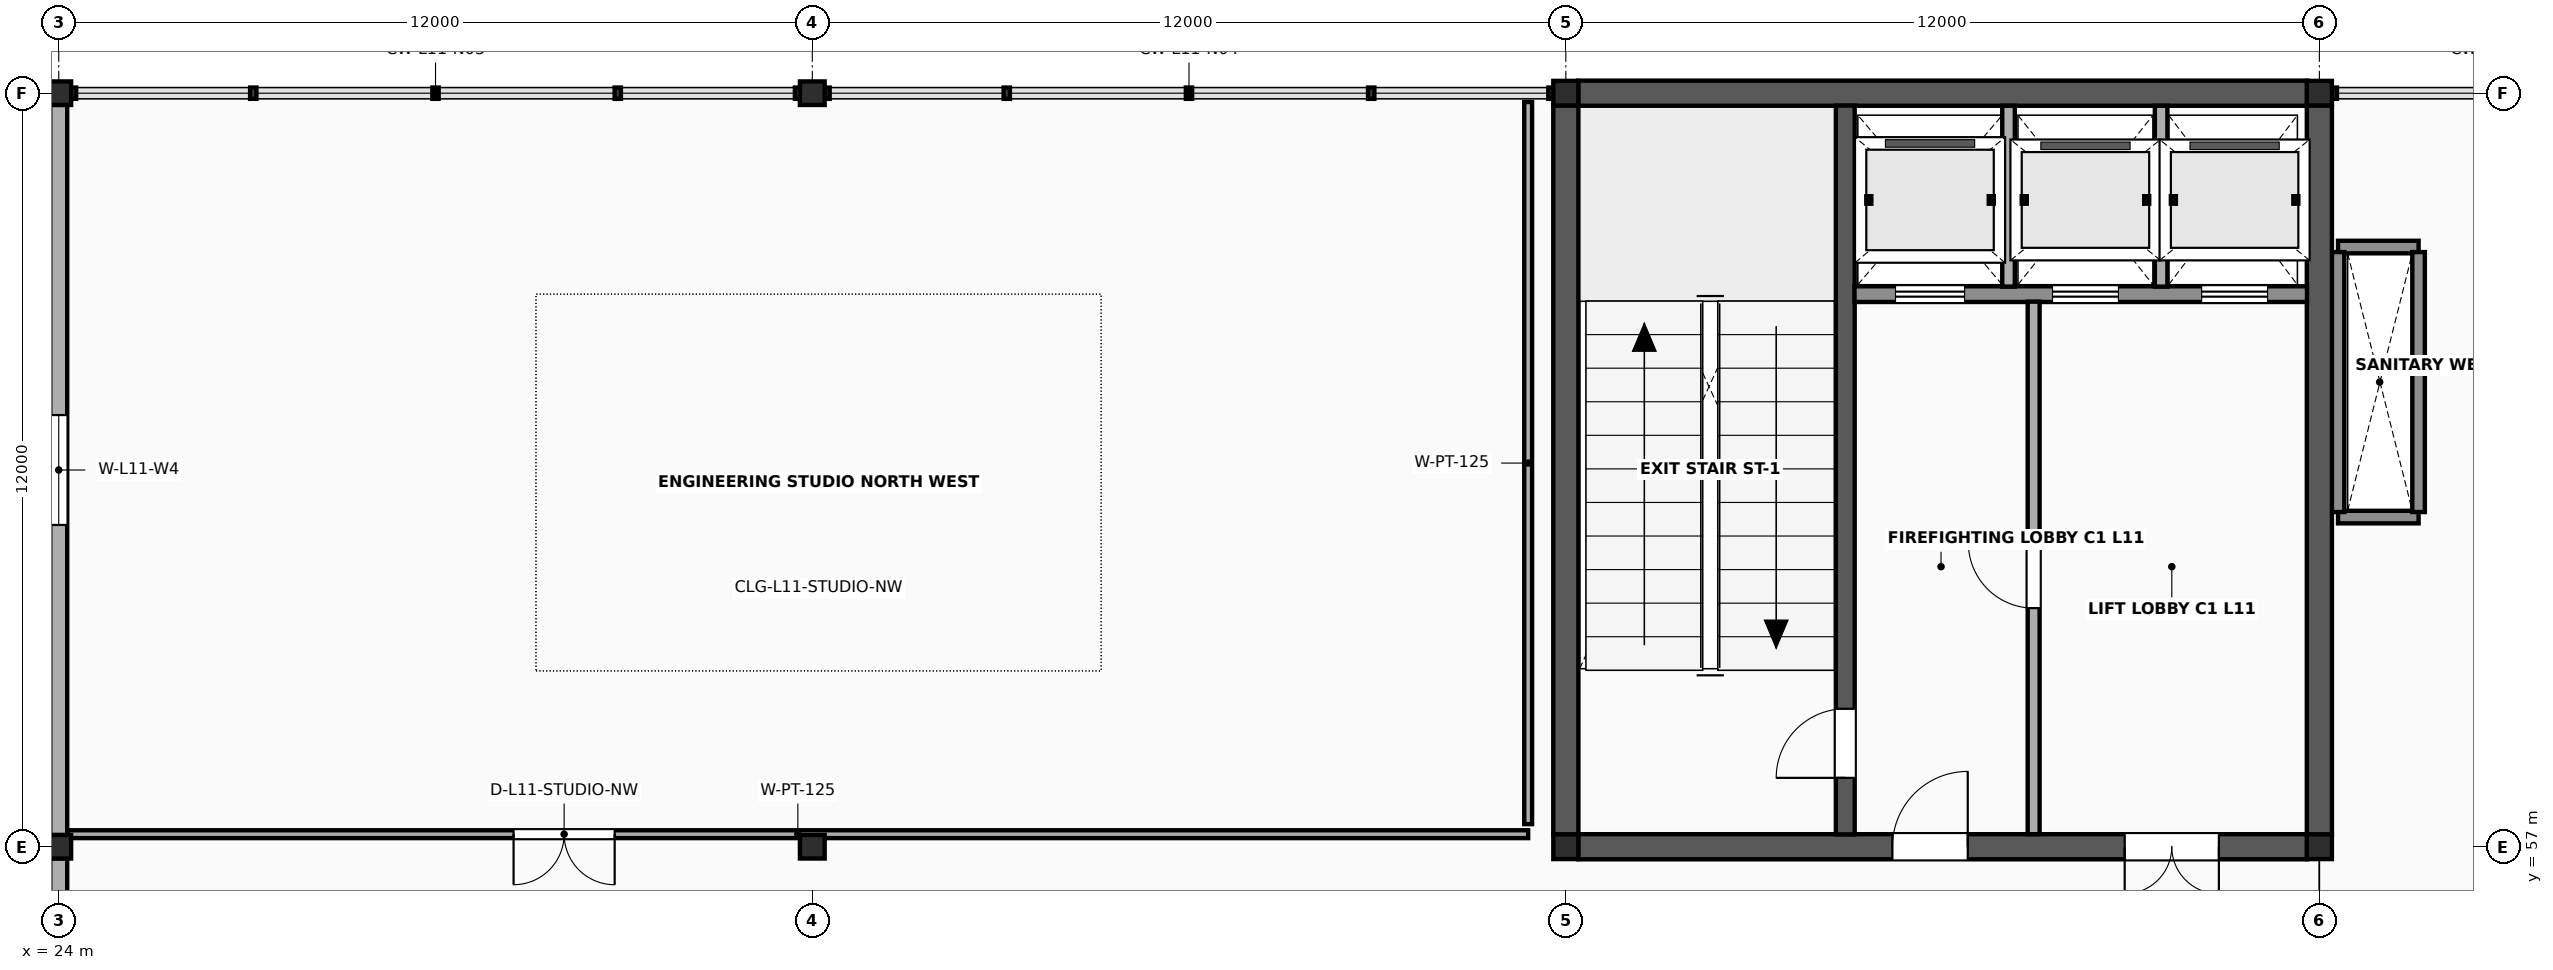
"""IFC4 building model, lengths in metres.
Left out: names, types, materials, properties, quantities, classifications, styles, units other than length and angle.
Written with IfcOpenShell. Run it as: python <this file> out.ifc"""

import sys

from ifc_helpers import new_model, si_unit, direction, frame, frame_2d, origin, origin_2d, place, context, subcontext, project, spatial, rectangle, i_section, extrude, element, fill, save


model = new_model("IFC4")
c1 = context("Model", 3, precision=1e-05, world=origin(), true_north=direction((0.0, 1.0)))
c2 = subcontext(c1, "Body", "Model", "MODEL_VIEW")
j1 = project(units=[si_unit("LENGTHUNIT", "METRE"), si_unit("PLANEANGLEUNIT", "RADIAN")], contexts=[c1])
p1 = place(None, origin())
s1 = spatial("IfcSite", under=j1, at=p1, CompositionType="ELEMENT")
p2 = place(p1, origin())
s2 = spatial("IfcBuilding", under=s1, at=p2, CompositionType="ELEMENT")
p3 = place(p2, frame((0.0, 0.0, 45.6)))
s3 = spatial("IfcBuildingStorey", under=s2, at=p3, CompositionType="ELEMENT", Elevation=45.6)
for number, where, z_axis, x_axis in (
    (1, (24.0, 57.0, 0.0), (0.0, 0.0, 1.0), (1.0, 0.0, 0.0)),
    (2, (24.0, 69.0, 0.0), (0.0, 0.0, 1.0), (1.0, 0.0, 0.0)),
    (3, (36.0, 57.0, 0.0), (0.0, 0.0, 1.0), (1.0, 0.0, 0.0)),
    (4, (36.0, 69.0, 0.0), (0.0, 0.0, 1.0), (1.0, 0.0, 0.0)),
):
    element("IfcColumn", number, at=place(p3, frame(where, z_axis=z_axis, x_axis=x_axis)), inside=s3, PredefinedType="COLUMN", context=c2, shape_type="SweptSolid", body=[
        extrude(i_section(OverallWidth=0.394, OverallDepth=0.375, WebThickness=0.017, FlangeThickness=0.028, FilletRadius=0.018, at=origin_2d()), origin(), (0.0, 0.0, 1.0), 4.0),
    ])
for number, where, z_axis, x_axis in (
    (5, (48.0, 57.0, 0.0), (0.0, 0.0, 1.0), (1.0, 0.0, 0.0)),
    (6, (48.0, 69.0, 0.0), (0.0, 0.0, 1.0), (1.0, 0.0, 0.0)),
    (7, (60.0, 57.0, 0.0), (0.0, 0.0, 1.0), (1.0, 0.0, 0.0)),
    (8, (60.0, 69.0, 0.0), (0.0, 0.0, 1.0), (1.0, 0.0, 0.0)),
):
    element("IfcColumn", number, at=place(p3, frame(where, z_axis=z_axis, x_axis=x_axis)), inside=s3, PredefinedType="COLUMN", context=c2, shape_type="SweptSolid", body=[
        extrude(i_section(OverallWidth=0.399, OverallDepth=0.393, WebThickness=0.023, FlangeThickness=0.037, FilletRadius=0.018, at=origin_2d()), origin(), (0.0, 0.0, 1.0), 4.0),
    ])
for number, where, z_axis, x_axis in (
    (9, (60.297, 62.25, 0.0), (0.0, 0.0, 1.0), (1.0, 0.0, 0.0)),
    (10, (60.297, 66.55, 0.0), (0.0, 0.0, 1.0), (1.0, 0.0, 0.0)),
):
    element("IfcWall", number, at=place(p3, frame(where, z_axis=z_axis, x_axis=x_axis)), inside=s3, PredefinedType="SOLIDWALL", context=c2, shape_type="SweptSolid", body=[
        extrude(rectangle(XDim=1.283, YDim=0.2, at=frame_2d((0.642, 0.0))), origin(), (0.0, 0.0, 1.0), 3.843),
    ])
for number, where, z_axis, x_axis in (
    (11, (60.297, 62.33, 0.0), (0.0, 0.0, 1.0), (0.0, 1.0, 0.0)),
    (12, (61.58, 62.33, 0.0), (0.0, 0.0, 1.0), (0.0, 1.0, 0.0)),
):
    element("IfcWall", number, at=place(p3, frame(where, z_axis=z_axis, x_axis=x_axis)), inside=s3, PredefinedType="SOLIDWALL", context=c2, shape_type="SweptSolid", body=[
        extrude(rectangle(XDim=4.14, YDim=0.2, at=frame_2d((2.07, 0.0))), origin(), (0.0, 0.0, 1.0), 3.843),
    ])
p4 = place(p3, frame((48.197, 57.0, 0.0), z_axis=(0.0, 0.0, 1.0), x_axis=(1.0, 0.0, 0.0)))
e13 = element("IfcWall", 13, at=p4, inside=s3, PredefinedType="SHEAR", context=c2, shape_type="SweptSolid", body=[
    extrude(rectangle(XDim=11.607, YDim=0.4, at=frame_2d((5.803, 0.0))), origin(), (0.0, 0.0, 1.0), 3.843),
])
p5 = place(p4, frame((5.004, 0.0, 0.0)))
e14 = element("IfcOpeningElement", 14, at=p5, cuts=e13, PredefinedType="OPENING", context=c2, shape_type="SweptSolid", body=[
    extrude(rectangle(XDim=1.2, YDim=2.2, at=frame_2d((0.6, 1.1))), frame((0.0, 0.215, 0.0), z_axis=(0.0, -1.0, 0.0), x_axis=(1.0, 0.0, 0.0)), (0.0, 0.0, 1.0), 0.43),
])
p6 = place(p4, frame((8.703, 0.0, 0.0)))
e15 = element("IfcOpeningElement", 15, at=p6, cuts=e13, PredefinedType="OPENING", context=c2, shape_type="SweptSolid", body=[
    extrude(rectangle(XDim=1.5, YDim=2.25, at=frame_2d((0.75, 1.125))), frame((0.0, 0.215, 0.0), z_axis=(0.0, -1.0, 0.0), x_axis=(1.0, 0.0, 0.0)), (0.0, 0.0, 1.0), 0.43),
])
p7 = place(p3, frame((48.197, 69.0, 0.0), z_axis=(0.0, 0.0, 1.0), x_axis=(1.0, 0.0, 0.0)))
e16 = element("IfcWall", 16, at=p7, inside=s3, PredefinedType="SHEAR", context=c2, shape_type="SweptSolid", body=[
    extrude(rectangle(XDim=11.607, YDim=0.4, at=frame_2d((5.803, 0.0))), origin(), (0.0, 0.0, 1.0), 3.843),
])
for number, where, z_axis, x_axis in (
    (17, (48.0, 57.194, 0.0), (0.0, 0.0, 1.0), (0.0, 1.0, 0.0)),
    (18, (60.0, 57.194, 0.0), (0.0, 0.0, 1.0), (0.0, 1.0, 0.0)),
):
    element("IfcWall", number, at=place(p3, frame(where, z_axis=z_axis, x_axis=x_axis)), inside=s3, PredefinedType="SHEAR", context=c2, shape_type="SweptSolid", body=[
        extrude(rectangle(XDim=11.613, YDim=0.4, at=frame_2d((5.806, 0.0))), origin(), (0.0, 0.0, 1.0), 3.843),
    ])
p8 = place(p3, frame((52.45, 57.197, 0.0), z_axis=(0.0, 0.0, 1.0), x_axis=(0.0, 1.0, 0.0)))
e19 = element("IfcWall", 19, at=p8, inside=s3, PredefinedType="SHEAR", context=c2, shape_type="SweptSolid", body=[
    extrude(rectangle(XDim=11.606, YDim=0.3, at=frame_2d((5.803, 0.0))), origin(), (0.0, 0.0, 1.0), 3.843),
])
p9 = place(p8, frame((0.9, 0.0, 0.0)))
e20 = element("IfcOpeningElement", 20, at=p9, cuts=e19, PredefinedType="OPENING", context=c2, shape_type="SweptSolid", body=[
    extrude(rectangle(XDim=1.1, YDim=2.2, at=frame_2d((0.55, 1.1))), frame((0.0, 0.165, 0.0), z_axis=(0.0, -1.0, 0.0), x_axis=(1.0, 0.0, 0.0)), (0.0, 0.0, 1.0), 0.33),
])
p10 = place(p3, frame((52.597, 65.8, 0.0), z_axis=(0.0, 0.0, 1.0), x_axis=(1.0, 0.0, 0.0)))
e21 = element("IfcWall", 21, at=p10, inside=s3, PredefinedType="SOLIDWALL", context=c2, shape_type="SweptSolid", body=[
    extrude(rectangle(XDim=7.206, YDim=0.25, at=frame_2d((3.603, 0.0))), origin(), (0.0, 0.0, 1.0), 3.843),
])
p11 = place(p10, frame((0.653, 0.0, 0.0)))
e22 = element("IfcOpeningElement", 22, at=p11, cuts=e21, PredefinedType="OPENING", context=c2, shape_type="SweptSolid", body=[
    extrude(rectangle(XDim=1.1, YDim=2.24, at=frame_2d((0.55, 1.12))), frame((0.0, 0.14, 0.0), z_axis=(0.0, -1.0, 0.0), x_axis=(1.0, 0.0, 0.0)), (0.0, 0.0, 1.0), 0.28),
])
p12 = place(p10, frame((3.153, 0.0, 0.0)))
e23 = element("IfcOpeningElement", 23, at=p12, cuts=e21, PredefinedType="OPENING", context=c2, shape_type="SweptSolid", body=[
    extrude(rectangle(XDim=1.05, YDim=2.2, at=frame_2d((0.525, 1.1))), frame((0.0, 0.14, 0.0), z_axis=(0.0, -1.0, 0.0), x_axis=(1.0, 0.0, 0.0)), (0.0, 0.0, 1.0), 0.28),
])
p13 = place(p10, frame((5.528, 0.0, 0.0)))
e24 = element("IfcOpeningElement", 24, at=p13, cuts=e21, PredefinedType="OPENING", context=c2, shape_type="SweptSolid", body=[
    extrude(rectangle(XDim=1.05, YDim=2.2, at=frame_2d((0.525, 1.1))), frame((0.0, 0.14, 0.0), z_axis=(0.0, -1.0, 0.0), x_axis=(1.0, 0.0, 0.0)), (0.0, 0.0, 1.0), 0.28),
])
for number, where, z_axis, x_axis in (
    (25, (55.05, 65.92, 0.0), (0.0, 0.0, 1.0), (0.0, 1.0, 0.0)),
    (26, (57.48, 65.92, 0.0), (0.0, 0.0, 1.0), (0.0, 1.0, 0.0)),
):
    element("IfcWall", number, at=place(p3, frame(where, z_axis=z_axis, x_axis=x_axis)), inside=s3, PredefinedType="SOLIDWALL", context=c2, shape_type="SweptSolid", body=[
        extrude(rectangle(XDim=2.88, YDim=0.2, at=frame_2d((1.44, 0.0))), origin(), (0.0, 0.0, 1.0), 3.833),
    ])
p14 = place(p3, frame((55.45, 57.2, 0.0), z_axis=(0.0, 0.0, 1.0), x_axis=(0.0, 1.0, 0.0)))
e27 = element("IfcWall", 27, at=p14, inside=s3, PredefinedType="SOLIDWALL", context=c2, shape_type="SweptSolid", body=[
    extrude(rectangle(XDim=8.48, YDim=0.19, at=frame_2d((4.24, 0.0))), origin(), (0.0, 0.0, 1.0), 3.833),
])
p15 = place(p14, frame((3.6, 0.0, 0.0)))
e28 = element("IfcOpeningElement", 28, at=p15, cuts=e27, PredefinedType="OPENING", context=c2, shape_type="SweptSolid", body=[
    extrude(rectangle(XDim=1.04, YDim=2.18, at=frame_2d((0.52, 1.09))), frame((0.0, 0.11, 0.0), z_axis=(0.0, -1.0, 0.0), x_axis=(1.0, 0.0, 0.0)), (0.0, 0.0, 1.0), 0.22),
])
p16 = place(p3, frame((24.0, 45.186, 0.0), z_axis=(0.0, 0.0, 1.0), x_axis=(0.0, 1.0, 0.0)))
e29 = element("IfcWall", 29, at=p16, inside=s3, PredefinedType="SOLIDWALL", context=c2, shape_type="SweptSolid", body=[
    extrude(rectangle(XDim=11.629, YDim=0.27, at=frame_2d((5.814, 0.0))), origin(), (0.0, 0.0, 1.0), 3.236),
])
p17 = place(p16, frame((5.014, 0.0, 0.78)))
e30 = element("IfcOpeningElement", 30, at=p17, cuts=e29, PredefinedType="OPENING", context=c2, shape_type="SweptSolid", body=[
    extrude(rectangle(XDim=1.6, YDim=1.25, at=frame_2d((0.8, 0.625))), frame((0.0, 0.15, 0.0), z_axis=(0.0, -1.0, 0.0), x_axis=(1.0, 0.0, 0.0)), (0.0, 0.0, 1.0), 0.3),
])
p18 = place(p3, frame((24.0, 57.186, 0.0), z_axis=(0.0, 0.0, 1.0), x_axis=(0.0, 1.0, 0.0)))
e31 = element("IfcWall", 31, at=p18, inside=s3, PredefinedType="SOLIDWALL", context=c2, shape_type="SweptSolid", body=[
    extrude(rectangle(XDim=11.629, YDim=0.27, at=frame_2d((5.814, 0.0))), origin(), (0.0, 0.0, 1.0), 3.236),
])
p19 = place(p18, frame((4.939, 0.0, 0.78)))
e32 = element("IfcOpeningElement", 32, at=p19, cuts=e31, PredefinedType="OPENING", context=c2, shape_type="SweptSolid", body=[
    extrude(rectangle(XDim=1.75, YDim=1.25, at=frame_2d((0.875, 0.625))), frame((0.0, 0.15, 0.0), z_axis=(0.0, -1.0, 0.0), x_axis=(1.0, 0.0, 0.0)), (0.0, 0.0, 1.0), 0.3),
])
p20 = place(p3, frame((24.14, 57.2, 0.0), z_axis=(0.0, 0.0, 1.0), x_axis=(1.0, 0.0, 0.0)))
e33 = element("IfcWall", 33, at=p20, inside=s3, PredefinedType="PARTITIONING", context=c2, shape_type="SweptSolid", body=[
    extrude(rectangle(XDim=23.26, YDim=0.125, at=frame_2d((11.63, 0.0))), origin(), (0.0, 0.0, 1.0), 2.88),
])
p21 = place(p20, frame((7.103, 0.0, 0.0)))
e34 = element("IfcOpeningElement", 34, at=p21, cuts=e33, PredefinedType="OPENING", context=c2, shape_type="SweptSolid", body=[
    extrude(rectangle(XDim=1.61, YDim=2.33, at=frame_2d((0.805, 1.165))), frame((0.0, 0.077, 0.0), z_axis=(0.0, -1.0, 0.0), x_axis=(1.0, 0.0, 0.0)), (0.0, 0.0, 1.0), 0.155),
])
p22 = place(p3, frame((47.4, 57.36, 0.0), z_axis=(0.0, 0.0, 1.0), x_axis=(0.0, 1.0, 0.0)))
e35 = element("IfcWall", 35, at=p22, inside=s3, PredefinedType="PARTITIONING", context=c2, shape_type="SweptSolid", body=[
    extrude(rectangle(XDim=11.5, YDim=0.125, at=frame_2d((5.75, 0.0))), origin(), (0.0, 0.0, 1.0), 2.88),
])
p23 = place(p19, origin())
e36 = element("IfcWindow", 36, at=p23, inside=s3, PartitioningType="SINGLE_PANEL", PredefinedType="WINDOW", context=c2, shape_type="SweptSolid", body=[
    extrude(rectangle(XDim=1.75, YDim=1.25, at=frame_2d((0.875, 0.625))), frame((0.0, 0.03, 0.0), z_axis=(0.0, -1.0, 0.0), x_axis=(1.0, 0.0, 0.0)), (0.0, 0.0, 1.0), 0.06),
])
fill(e32, e36)
p24 = place(p9, origin())
e37 = element("IfcDoor", 37, at=p24, inside=s3, OperationType="SINGLE_SWING_LEFT", PredefinedType="DOOR", context=c2, shape_type="SweptSolid", body=[
    extrude(rectangle(XDim=1.1, YDim=2.2, at=frame_2d((0.55, 1.1))), frame((0.0, 0.025, 0.0), z_axis=(0.0, -1.0, 0.0), x_axis=(1.0, 0.0, 0.0)), (0.0, 0.0, 1.0), 0.05),
])
fill(e20, e37)
p25 = place(p15, origin())
e38 = element("IfcDoor", 38, at=p25, inside=s3, OperationType="SINGLE_SWING_RIGHT", PredefinedType="DOOR", context=c2, shape_type="SweptSolid", body=[
    extrude(rectangle(XDim=1.04, YDim=2.18, at=frame_2d((0.52, 1.09))), frame((0.0, 0.025, 0.0), z_axis=(0.0, -1.0, 0.0), x_axis=(1.0, 0.0, 0.0)), (0.0, 0.0, 1.0), 0.05),
])
fill(e28, e38)
p26 = place(p5, origin())
e39 = element("IfcDoor", 39, at=p26, inside=s3, OperationType="SINGLE_SWING_RIGHT", PredefinedType="DOOR", context=c2, shape_type="SweptSolid", body=[
    extrude(rectangle(XDim=1.2, YDim=2.2, at=frame_2d((0.6, 1.1))), frame((0.0, 0.025, 0.0), z_axis=(0.0, -1.0, 0.0), x_axis=(1.0, 0.0, 0.0)), (0.0, 0.0, 1.0), 0.05),
])
fill(e14, e39)
p27 = place(p6, origin())
e40 = element("IfcDoor", 40, at=p27, inside=s3, OperationType="DOUBLE_DOOR_SINGLE_SWING", PredefinedType="DOOR", context=c2, shape_type="SweptSolid", body=[
    extrude(rectangle(XDim=1.5, YDim=2.25, at=frame_2d((0.75, 1.125))), frame((0.0, 0.025, 0.0), z_axis=(0.0, -1.0, 0.0), x_axis=(1.0, 0.0, 0.0)), (0.0, 0.0, 1.0), 0.05),
])
fill(e15, e40)
p28 = place(p11, origin())
e41 = element("IfcDoor", 41, at=p28, inside=s3, OperationType="SLIDING_TO_LEFT", PredefinedType="USERDEFINED", context=c2, shape_type="SweptSolid", body=[
    extrude(rectangle(XDim=1.1, YDim=2.24, at=frame_2d((0.55, 1.12))), frame((0.0, 0.025, 0.0), z_axis=(0.0, -1.0, 0.0), x_axis=(1.0, 0.0, 0.0)), (0.0, 0.0, 1.0), 0.05),
])
fill(e22, e41)
p29 = place(p12, origin())
e42 = element("IfcDoor", 42, at=p29, inside=s3, OperationType="SLIDING_TO_LEFT", PredefinedType="USERDEFINED", context=c2, shape_type="SweptSolid", body=[
    extrude(rectangle(XDim=1.05, YDim=2.2, at=frame_2d((0.525, 1.1))), frame((0.0, 0.025, 0.0), z_axis=(0.0, -1.0, 0.0), x_axis=(1.0, 0.0, 0.0)), (0.0, 0.0, 1.0), 0.05),
])
fill(e23, e42)
p30 = place(p13, origin())
e43 = element("IfcDoor", 43, at=p30, inside=s3, OperationType="SLIDING_TO_LEFT", PredefinedType="USERDEFINED", context=c2, shape_type="SweptSolid", body=[
    extrude(rectangle(XDim=1.05, YDim=2.2, at=frame_2d((0.525, 1.1))), frame((0.0, 0.025, 0.0), z_axis=(0.0, -1.0, 0.0), x_axis=(1.0, 0.0, 0.0)), (0.0, 0.0, 1.0), 0.05),
])
fill(e24, e43)
p31 = place(p21, origin())
e44 = element("IfcDoor", 44, at=p31, inside=s3, OperationType="DOUBLE_DOOR_SINGLE_SWING", PredefinedType="DOOR", context=c2, shape_type="SweptSolid", body=[
    extrude(rectangle(XDim=1.61, YDim=2.33, at=frame_2d((0.805, 1.165))), frame((0.0, 0.025, 0.0), z_axis=(0.0, -1.0, 0.0), x_axis=(1.0, 0.0, 0.0)), (0.0, 0.0, 1.0), 0.05),
])
fill(e34, e44)
save(model, sys.argv[1])
